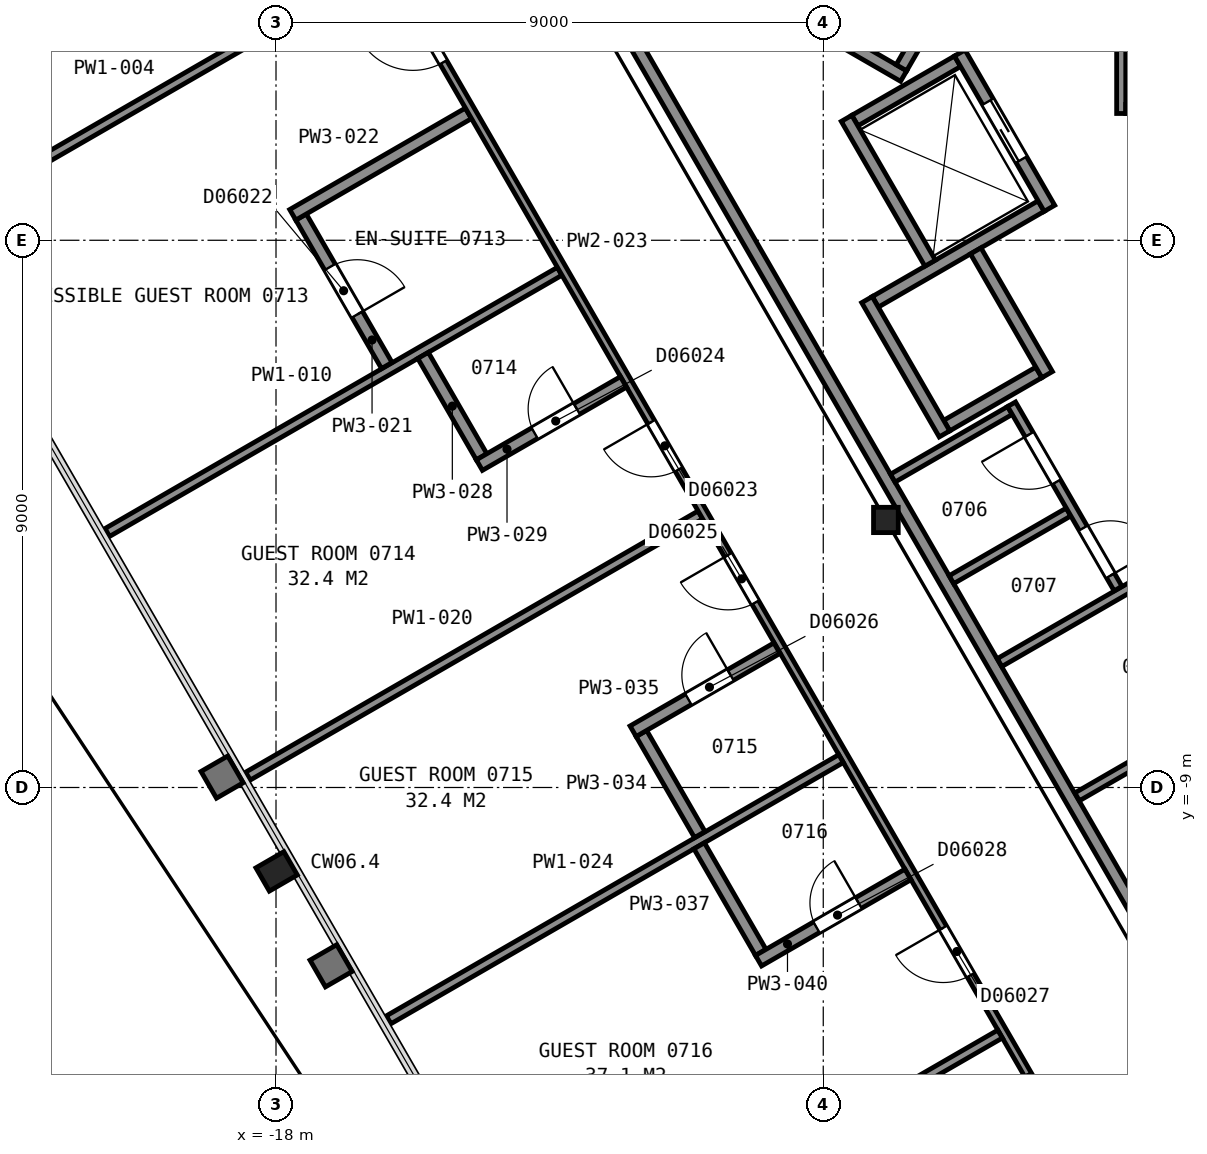
"""IFC4 building model, lengths in metres.
Left out: names, types, materials, properties, quantities, classifications, styles, units other than length and angle.
Written with IfcOpenShell. Run it as: python <this file> out.ifc"""

import sys

from ifc_helpers import new_model, si_unit, direction, frame, frame_2d, origin, origin_2d, place, context, subcontext, project, spatial, rectangle, i_section, extrude, element, fill, save


model = new_model("IFC4")
c1 = context("Model", 3, precision=1e-05, world=origin(), true_north=direction((0.0, 1.0)))
c2 = subcontext(c1, "Body", "Model", "MODEL_VIEW")
j1 = project(units=[si_unit("LENGTHUNIT", "METRE"), si_unit("PLANEANGLEUNIT", "RADIAN")], contexts=[c1])
p1 = place(None, origin())
s1 = spatial("IfcSite", under=j1, at=p1, CompositionType="ELEMENT")
p2 = place(p1, origin())
s2 = spatial("IfcBuilding", under=s1, at=p2, CompositionType="ELEMENT")
p3 = place(p2, frame((0.0, 0.0, 40.4)))
s3 = spatial("IfcBuildingStorey", under=s2, at=p3, CompositionType="ELEMENT", Elevation=40.4)
p4 = place(p3, frame((-17.99, -10.38, 0.0), z_axis=(0.0, 0.0, 1.0), x_axis=(-0.5, 0.866025403784, 0.0)))
e1 = element("IfcColumn", 1, at=p4, inside=s3, PredefinedType="COLUMN", context=c2, shape_type="SweptSolid", body=[
    extrude(i_section(OverallWidth=0.442, OverallDepth=0.531, WebThickness=0.066, FlangeThickness=0.106, FilletRadius=0.015, at=origin_2d()), origin(), (0.0, 0.0, 1.0), 3.575),
])
p5 = place(p3, frame((-7.97, -4.6, 0.0), z_axis=(0.0, 0.0, 1.0), x_axis=(1.0, 0.0, 0.0)))
e2 = element("IfcColumn", 2, at=p5, inside=s3, PredefinedType="COLUMN", context=c2, shape_type="SweptSolid", body=[
    extrude(i_section(OverallWidth=0.406, OverallDepth=0.417, WebThickness=0.03, FlangeThickness=0.048, FilletRadius=0.015, at=origin_2d()), origin(), (0.0, 0.0, 1.0), 3.6),
])
p6 = place(p3, frame((-7.678, 2.701, 0.0), z_axis=(0.0, 0.0, 1.0), x_axis=(-0.866026010844, 0.49999894854, 0.0)))
e3 = element("IfcWall", 3, at=p6, inside=s3, PredefinedType="PARTITIONING", context=c2, shape_type="SweptSolid", body=[
    extrude(rectangle(XDim=12.0, YDim=0.2, at=frame_2d((6.0, 0.0))), origin(), (0.0, 0.0, 1.0), 3.35),
])
p7 = place(p3, frame((-6.315, 5.262, 0.0), z_axis=(0.0, 0.0, 1.0), x_axis=(-0.500049511043, -0.865996816683, 0.0)))
e4 = element("IfcWall", 4, at=p7, inside=s3, PredefinedType="PARTITIONING", context=c2, shape_type="SweptSolid", body=[
    extrude(rectangle(XDim=2.8, YDim=0.2, at=frame_2d((1.4, 0.0))), origin(), (0.0, 0.0, 1.0), 3.35),
])
p8 = place(p3, frame((-6.97, -3.048, 0.0), z_axis=(0.0, 0.0, 1.0), x_axis=(0.866036909293, 0.499980071345, 0.0)))
e5 = element("IfcWall", 5, at=p8, inside=s3, PredefinedType="PARTITIONING", context=c2, shape_type="SweptSolid", body=[
    extrude(rectangle(XDim=1.75, YDim=0.2, at=frame_2d((0.875, 0.0))), origin(), (0.0, 0.0, 1.0), 3.6),
])
p9 = place(p3, frame((-8.145, -1.013, 0.0), z_axis=(0.0, 0.0, 1.0), x_axis=(0.866016494683, 0.500015430699, 0.0)))
e6 = element("IfcWall", 6, at=p9, inside=s3, PredefinedType="PARTITIONING", context=c2, shape_type="SweptSolid", body=[
    extrude(rectangle(XDim=3.15, YDim=0.2, at=frame_2d((1.575, 0.0))), origin(), (0.0, 0.0, 1.0), 3.6),
])
p10 = place(p3, frame((-8.48, 1.969, 0.0), z_axis=(0.0, 0.0, 1.0), x_axis=(0.866000020948, 0.500043961785, 0.0)))
e7 = element("IfcWall", 7, at=p10, inside=s3, PredefinedType="PARTITIONING", context=c2, shape_type="SweptSolid", body=[
    extrude(rectangle(XDim=1.95, YDim=0.2, at=frame_2d((0.975, 0.0))), origin(), (0.0, 0.0, 1.0), 3.6),
])
p11 = place(p3, frame((-5.28, 0.525, 0.0), z_axis=(0.0, 0.0, 1.0), x_axis=(-0.500037662692, 0.866003658127, 0.0)))
e8 = element("IfcWall", 8, at=p11, inside=s3, PredefinedType="PARTITIONING", context=c2, shape_type="SweptSolid", body=[
    extrude(rectangle(XDim=2.95, YDim=0.2, at=frame_2d((1.475, 0.0))), origin(), (0.0, 0.0, 1.0), 3.6),
])
p12 = place(p11, frame((0.925, 0.0, 0.0)))
e9 = element("IfcOpeningElement", 9, at=p12, cuts=e8, PredefinedType="OPENING", context=c2, shape_type="SweptSolid", body=[
    extrude(rectangle(XDim=1.1, YDim=2.1, at=frame_2d((0.55, 1.05))), frame((0.0, 0.11, 0.0), z_axis=(0.0, -1.0, 0.0), x_axis=(1.0, 0.0, 0.0)), (0.0, 0.0, 1.0), 0.22),
])
p13 = place(p3, frame((-5.318, -2.21, 0.0), z_axis=(0.0, 0.0, 1.0), x_axis=(-0.499938297808, 0.866061024631, 0.0)))
e10 = element("IfcWall", 10, at=p13, inside=s3, PredefinedType="PARTITIONING", context=c2, shape_type="SweptSolid", body=[
    extrude(rectangle(XDim=2.35, YDim=0.2, at=frame_2d((1.175, 0.0))), origin(), (0.0, 0.0, 1.0), 3.6),
])
p14 = place(p3, frame((-7.242, -0.376, 0.0), z_axis=(0.0, 0.0, 1.0), x_axis=(-0.499996545922, 0.866027397988, 0.0)))
e11 = element("IfcWall", 11, at=p14, inside=s3, PredefinedType="PARTITIONING", context=c2, shape_type="SweptSolid", body=[
    extrude(rectangle(XDim=2.75, YDim=0.2, at=frame_2d((1.375, 0.0))), origin(), (0.0, 0.0, 1.0), 3.6),
])
p15 = place(p3, frame((-7.006, -3.185, 0.0), z_axis=(0.0, 0.0, 1.0), x_axis=(-0.499990435942, 0.866030925526, 0.0)))
e12 = element("IfcWall", 12, at=p15, inside=s3, PredefinedType="PARTITIONING", context=c2, shape_type="SweptSolid", body=[
    extrude(rectangle(XDim=2.55, YDim=0.2, at=frame_2d((1.275, 0.0))), origin(), (0.0, 0.0, 1.0), 3.6),
])
p16 = place(p3, frame((-13.664, 5.946, 0.0), z_axis=(0.0, 0.0, 1.0), x_axis=(0.499994327219, -0.866028678941, 0.0)))
e13 = element("IfcWall", 13, at=p16, inside=s3, PredefinedType="PARTITIONING", context=c2, shape_type="SweptSolid", body=[
    extrude(rectangle(XDim=23.968, YDim=0.2, at=frame_2d((11.984, 0.0))), origin(), (0.0, 0.0, 1.0), 3.35),
])
p17 = place(p3, frame((-7.856, -3.912, 0.0), z_axis=(0.0, 0.0, 1.0), x_axis=(0.865971748, 0.500092923031, 0.0)))
e14 = element("IfcWall", 14, at=p17, inside=s3, PredefinedType="PARTITIONING", context=c2, shape_type="SweptSolid", body=[
    extrude(rectangle(XDim=2.225, YDim=0.15, at=frame_2d((1.112, 0.0))), origin(), (0.0, 0.0, 1.0), 3.35),
])
p18 = place(p3, frame((-6.892, -5.582, 0.0), z_axis=(0.0, 0.0, 1.0), x_axis=(0.865944298464, 0.500140452231, 0.0)))
e15 = element("IfcWall", 15, at=p18, inside=s3, PredefinedType="PARTITIONING", context=c2, shape_type="SweptSolid", body=[
    extrude(rectangle(XDim=2.224, YDim=0.15, at=frame_2d((1.112, 0.0))), origin(), (0.0, 0.0, 1.0), 3.35),
])
p19 = place(p3, frame((-6.1, -6.946, 0.0), z_axis=(0.0, 0.0, 1.0), x_axis=(0.866038200431, 0.499977834903, 0.0)))
e16 = element("IfcWall", 16, at=p19, inside=s3, PredefinedType="PARTITIONING", context=c2, shape_type="SweptSolid", body=[
    extrude(rectangle(XDim=4.22, YDim=0.15, at=frame_2d((2.11, 0.0))), origin(), (0.0, 0.0, 1.0), 3.35),
])
p20 = place(p3, frame((-4.152, -5.729, 0.0), z_axis=(0.0, 0.0, 1.0), x_axis=(-0.500024287448, 0.866011380966, 0.0)))
e17 = element("IfcWall", 17, at=p20, inside=s3, PredefinedType="PARTITIONING", context=c2, shape_type="SweptSolid", body=[
    extrude(rectangle(XDim=3.501, YDim=0.15, at=frame_2d((1.75, 0.0))), origin(), (0.0, 0.0, 1.0), 3.35),
])
p21 = place(p20, frame((2.026, 0.0, 0.0)))
e18 = element("IfcOpeningElement", 18, at=p21, cuts=e17, PredefinedType="OPENING", context=c2, shape_type="SweptSolid", body=[
    extrude(rectangle(XDim=0.9, YDim=2.1, at=frame_2d((0.45, 1.05))), frame((0.0, 0.085, 0.0), z_axis=(0.0, -1.0, 0.0), x_axis=(1.0, 0.0, 0.0)), (0.0, 0.0, 1.0), 0.17),
])
p22 = place(p20, frame((0.248, 0.0, 0.0)))
e19 = element("IfcOpeningElement", 19, at=p22, cuts=e17, PredefinedType="OPENING", context=c2, shape_type="SweptSolid", body=[
    extrude(rectangle(XDim=0.9, YDim=2.1, at=frame_2d((0.45, 1.05))), frame((0.0, 0.085, 0.0), z_axis=(0.0, -1.0, 0.0), x_axis=(1.0, 0.0, 0.0)), (0.0, 0.0, 1.0), 0.17),
])
p23 = place(p3, frame((-4.825, -9.154, 0.0), z_axis=(0.0, 0.0, 1.0), x_axis=(0.866023738697, 0.500002884005, 0.0)))
e20 = element("IfcWall", 20, at=p23, inside=s3, PredefinedType="PARTITIONING", context=c2, shape_type="SweptSolid", body=[
    extrude(rectangle(XDim=4.22, YDim=0.15, at=frame_2d((2.11, 0.0))), origin(), (0.0, 0.0, 1.0), 3.35),
])
p24 = place(p23, frame((1.595, 0.0, 0.0)))
e21 = element("IfcOpeningElement", 21, at=p24, cuts=e20, PredefinedType="OPENING", context=c2, shape_type="SweptSolid", body=[
    extrude(rectangle(XDim=0.9, YDim=2.1, at=frame_2d((0.45, 1.05))), frame((0.0, 0.085, 0.0), z_axis=(0.0, -1.0, 0.0), x_axis=(1.0, 0.0, 0.0)), (0.0, 0.0, 1.0), 0.17),
])
p25 = place(p3, frame((-4.1, 2.085, 0.0), z_axis=(0.0, 0.0, 1.0), x_axis=(0.0, 1.0, 0.0)))
e22 = element("IfcWall", 22, at=p25, inside=s3, PredefinedType="PARTITIONING", context=c2, shape_type="SweptSolid", body=[
    extrude(rectangle(XDim=3.523, YDim=0.15, at=frame_2d((1.761, 0.0))), origin(), (0.0, 0.0, 1.0), 3.35),
])
p26 = place(p3, frame((-4.025, 2.16, 0.0), z_axis=(0.0, 0.0, 1.0), x_axis=(1.0, 0.0, 0.0)))
e23 = element("IfcWall", 23, at=p26, inside=s3, PredefinedType="PARTITIONING", context=c2, shape_type="SweptSolid", body=[
    extrude(rectangle(XDim=1.238, YDim=0.15, at=frame_2d((0.619, 0.0))), origin(), (0.0, 0.0, 1.0), 3.35),
])
p27 = place(p3, frame((-23.693, 0.247, 0.0), z_axis=(0.0, 0.0, 1.0), x_axis=(0.866031705461, 0.499989085017, 0.0)))
e24 = element("IfcWall", 24, at=p27, inside=s3, PredefinedType="PARTITIONING", context=c2, shape_type="SweptSolid", body=[
    extrude(rectangle(XDim=8.587, YDim=0.15, at=frame_2d((4.293, 0.0))), origin(), (0.0, 0.0, 1.0), 2.613),
])
p28 = place(p3, frame((-20.775, -4.806, 0.0), z_axis=(0.0, 0.0, 1.0), x_axis=(0.865995804368, 0.50005126419, 0.0)))
e25 = element("IfcWall", 25, at=p28, inside=s3, PredefinedType="PARTITIONING", context=c2, shape_type="SweptSolid", body=[
    extrude(rectangle(XDim=8.591, YDim=0.15, at=frame_2d((4.295, 0.0))), origin(), (0.0, 0.0, 1.0), 2.613),
])
p29 = place(p3, frame((-18.462, -8.813, 0.0), z_axis=(0.0, 0.0, 1.0), x_axis=(0.866029425019, 0.499993034952, 0.0)))
e26 = element("IfcWall", 26, at=p29, inside=s3, PredefinedType="PARTITIONING", context=c2, shape_type="SweptSolid", body=[
    extrude(rectangle(XDim=8.591, YDim=0.15, at=frame_2d((4.296, 0.0))), origin(), (0.0, 0.0, 1.0), 2.613),
])
p30 = place(p3, frame((-17.588, 0.382, 0.0), z_axis=(0.0, 0.0, 1.0), x_axis=(0.499984757355, -0.866034203951, 0.0)))
e27 = element("IfcWall", 27, at=p30, inside=s3, PredefinedType="PARTITIONING", context=c2, shape_type="SweptSolid", body=[
    extrude(rectangle(XDim=2.82, YDim=0.2, at=frame_2d((1.41, 0.0))), origin(), (0.0, 0.0, 1.0), 2.613),
])
p31 = place(p30, frame((0.95, 0.0, 0.0)))
e28 = element("IfcOpeningElement", 28, at=p31, cuts=e27, PredefinedType="OPENING", context=c2, shape_type="SweptSolid", body=[
    extrude(rectangle(XDim=0.9, YDim=2.1, at=frame_2d((0.45, 1.05))), frame((0.0, 0.11, 0.0), z_axis=(0.0, -1.0, 0.0), x_axis=(1.0, 0.0, 0.0)), (0.0, 0.0, 1.0), 0.22),
])
p32 = place(p3, frame((-17.725, 0.419, 0.0), z_axis=(0.0, 0.0, 1.0), x_axis=(0.865960142641, 0.500113018585, 0.0)))
e29 = element("IfcWall", 29, at=p32, inside=s3, PredefinedType="PARTITIONING", context=c2, shape_type="SweptSolid", body=[
    extrude(rectangle(XDim=3.337, YDim=0.2, at=frame_2d((1.668, 0.0))), origin(), (0.0, 0.0, 1.0), 2.613),
])
p33 = place(p3, frame((-3.766, -16.958, 0.0), z_axis=(0.0, 0.0, 1.0), x_axis=(-0.500024758804, 0.866011108811, 0.0)))
e30 = element("IfcWall", 30, at=p33, inside=s3, PredefinedType="PARTITIONING", context=c2, shape_type="SweptSolid", body=[
    extrude(rectangle(XDim=26.402, YDim=0.125, at=frame_2d((13.201, 0.0))), origin(), (0.0, 0.0, 1.0), 2.613),
])
p34 = place(p33, frame((25.139, 0.0, 0.0)))
e31 = element("IfcOpeningElement", 31, at=p34, cuts=e30, PredefinedType="OPENING", context=c2, shape_type="SweptSolid", body=[
    extrude(rectangle(XDim=0.9, YDim=2.1, at=frame_2d((0.45, 1.05))), frame((0.0, 0.073, 0.0), z_axis=(0.0, -1.0, 0.0), x_axis=(1.0, 0.0, 0.0)), (0.0, 0.0, 1.0), 0.145),
])
p35 = place(p33, frame((22.963, 0.0, 0.0)))
e32 = element("IfcOpeningElement", 32, at=p35, cuts=e30, PredefinedType="OPENING", context=c2, shape_type="SweptSolid", body=[
    extrude(rectangle(XDim=1.0, YDim=2.1, at=frame_2d((0.5, 1.05))), frame((0.0, 0.073, 0.0), z_axis=(0.0, -1.0, 0.0), x_axis=(1.0, 0.0, 0.0)), (0.0, 0.0, 1.0), 0.145),
])
p36 = place(p33, frame((15.228, 0.0, 0.0)))
e33 = element("IfcOpeningElement", 33, at=p36, cuts=e30, PredefinedType="OPENING", context=c2, shape_type="SweptSolid", body=[
    extrude(rectangle(XDim=0.9, YDim=2.1, at=frame_2d((0.45, 1.05))), frame((0.0, 0.073, 0.0), z_axis=(0.0, -1.0, 0.0), x_axis=(1.0, 0.0, 0.0)), (0.0, 0.0, 1.0), 0.145),
])
p37 = place(p33, frame((12.702, 0.0, 0.0)))
e34 = element("IfcOpeningElement", 34, at=p37, cuts=e30, PredefinedType="OPENING", context=c2, shape_type="SweptSolid", body=[
    extrude(rectangle(XDim=0.9, YDim=2.1, at=frame_2d((0.45, 1.05))), frame((0.0, 0.073, 0.0), z_axis=(0.0, -1.0, 0.0), x_axis=(1.0, 0.0, 0.0)), (0.0, 0.0, 1.0), 0.145),
])
p38 = place(p33, frame((5.624, 0.0, 0.0)))
e35 = element("IfcOpeningElement", 35, at=p38, cuts=e30, PredefinedType="OPENING", context=c2, shape_type="SweptSolid", body=[
    extrude(rectangle(XDim=0.9, YDim=2.1, at=frame_2d((0.45, 1.05))), frame((0.0, 0.073, 0.0), z_axis=(0.0, -1.0, 0.0), x_axis=(1.0, 0.0, 0.0)), (0.0, 0.0, 1.0), 0.145),
])
p39 = place(p33, frame((2.843, 0.0, 0.0)))
e36 = element("IfcOpeningElement", 36, at=p39, cuts=e30, PredefinedType="OPENING", context=c2, shape_type="SweptSolid", body=[
    extrude(rectangle(XDim=0.9, YDim=2.1, at=frame_2d((0.45, 1.05))), frame((0.0, 0.073, 0.0), z_axis=(0.0, -1.0, 0.0), x_axis=(1.0, 0.0, 0.0)), (0.0, 0.0, 1.0), 0.145),
])
p40 = place(p3, frame((-16.148, -12.821, 0.0), z_axis=(0.0, 0.0, 1.0), x_axis=(0.866036528751, 0.499980730498, 0.0)))
e37 = element("IfcWall", 37, at=p40, inside=s3, PredefinedType="PARTITIONING", context=c2, shape_type="SweptSolid", body=[
    extrude(rectangle(XDim=8.592, YDim=0.15, at=frame_2d((4.296, 0.0))), origin(), (0.0, 0.0, 1.0), 2.613),
])
p41 = place(p3, frame((-15.582, -1.894, 0.0), z_axis=(0.0, 0.0, 1.0), x_axis=(0.500026156197, -0.86601030197, 0.0)))
e38 = element("IfcWall", 38, at=p41, inside=s3, PredefinedType="PARTITIONING", context=c2, shape_type="SweptSolid", body=[
    extrude(rectangle(XDim=1.925, YDim=0.2, at=frame_2d((0.963, 0.0))), origin(), (0.0, 0.0, 1.0), 2.613),
])
p42 = place(p3, frame((-14.656, -3.698, 0.0), z_axis=(0.0, 0.0, 1.0), x_axis=(0.866005850709, 0.50003386539, 0.0)))
e39 = element("IfcWall", 39, at=p42, inside=s3, PredefinedType="PARTITIONING", context=c2, shape_type="SweptSolid", body=[
    extrude(rectangle(XDim=2.737, YDim=0.2, at=frame_2d((1.369, 0.0))), origin(), (0.0, 0.0, 1.0), 2.613),
])
p43 = place(p42, frame((1.05, 0.0, 0.0)))
e40 = element("IfcOpeningElement", 40, at=p43, cuts=e39, PredefinedType="OPENING", context=c2, shape_type="SweptSolid", body=[
    extrude(rectangle(XDim=0.8, YDim=2.1, at=frame_2d((0.4, 1.05))), frame((0.0, 0.11, 0.0), z_axis=(0.0, -1.0, 0.0), x_axis=(1.0, 0.0, 0.0)), (0.0, 0.0, 1.0), 0.22),
])
p44 = place(p3, frame((-13.532, -17.351, 0.0), z_axis=(0.0, 0.0, 1.0), x_axis=(0.866002910178, 0.500038958046, 0.0)))
e41 = element("IfcWall", 41, at=p44, inside=s3, PredefinedType="PARTITIONING", context=c2, shape_type="SweptSolid", body=[
    extrude(rectangle(XDim=8.591, YDim=0.15, at=frame_2d((4.295, 0.0))), origin(), (0.0, 0.0, 1.0), 2.613),
])
p45 = place(p3, frame((-11.991, -8.112, 0.0), z_axis=(0.0, 0.0, 1.0), x_axis=(0.499913221443, -0.866075499611, 0.0)))
e42 = element("IfcWall", 42, at=p45, inside=s3, PredefinedType="PARTITIONING", context=c2, shape_type="SweptSolid", body=[
    extrude(rectangle(XDim=1.92, YDim=0.2, at=frame_2d((0.96, 0.0))), origin(), (0.0, 0.0, 1.0), 2.613),
])
p46 = place(p3, frame((-9.761, -6.709, 0.0), z_axis=(0.0, 0.0, 1.0), x_axis=(-0.866012976267, -0.500021524473, 0.0)))
e43 = element("IfcWall", 43, at=p46, inside=s3, PredefinedType="PARTITIONING", context=c2, shape_type="SweptSolid", body=[
    extrude(rectangle(XDim=2.732, YDim=0.2, at=frame_2d((1.366, 0.0))), origin(), (0.0, 0.0, 1.0), 2.613),
])
p47 = place(p46, frame((0.882, 0.0, 0.0)))
e44 = element("IfcOpeningElement", 44, at=p47, cuts=e43, PredefinedType="OPENING", context=c2, shape_type="SweptSolid", body=[
    extrude(rectangle(XDim=0.8, YDim=2.1, at=frame_2d((0.4, 1.05))), frame((0.0, 0.11, 0.0), z_axis=(0.0, -1.0, 0.0), x_axis=(1.0, 0.0, 0.0)), (0.0, 0.0, 1.0), 0.22),
])
p48 = place(p3, frame((-11.041, -9.959, 0.0), z_axis=(0.0, 0.0, 1.0), x_axis=(0.500042536776, -0.866000843773, 0.0)))
e45 = element("IfcWall", 45, at=p48, inside=s3, PredefinedType="PARTITIONING", context=c2, shape_type="SweptSolid", body=[
    extrude(rectangle(XDim=2.025, YDim=0.2, at=frame_2d((1.012, 0.0))), origin(), (0.0, 0.0, 1.0), 2.613),
])
p49 = place(p3, frame((-10.065, -11.849, 0.0), z_axis=(0.0, 0.0, 1.0), x_axis=(0.866048046904, 0.499960778915, 0.0)))
e46 = element("IfcWall", 46, at=p49, inside=s3, PredefinedType="PARTITIONING", context=c2, shape_type="SweptSolid", body=[
    extrude(rectangle(XDim=2.838, YDim=0.2, at=frame_2d((1.419, 0.0))), origin(), (0.0, 0.0, 1.0), 2.613),
])
p50 = place(p49, frame((1.1, 0.0, 0.0)))
e47 = element("IfcOpeningElement", 47, at=p50, cuts=e46, PredefinedType="OPENING", context=c2, shape_type="SweptSolid", body=[
    extrude(rectangle(XDim=0.8, YDim=2.1, at=frame_2d((0.4, 1.05))), frame((0.0, 0.11, 0.0), z_axis=(0.0, -1.0, 0.0), x_axis=(1.0, 0.0, 0.0)), (0.0, 0.0, 1.0), 0.22),
])
p51 = place(p12, origin())
e48 = element("IfcDoor", 48, at=p51, inside=s3, OperationType="SLIDING_TO_LEFT", PredefinedType="DOOR", context=c2, shape_type="SweptSolid", body=[
    extrude(rectangle(XDim=1.1, YDim=2.1, at=frame_2d((0.55, 1.05))), frame((0.0, 0.025, 0.0), z_axis=(0.0, -1.0, 0.0), x_axis=(1.0, 0.0, 0.0)), (0.0, 0.0, 1.0), 0.05),
])
fill(e9, e48)
p52 = place(p21, origin())
e49 = element("IfcDoor", 49, at=p52, inside=s3, OperationType="SINGLE_SWING_RIGHT", PredefinedType="DOOR", context=c2, shape_type="SweptSolid", body=[
    extrude(rectangle(XDim=0.9, YDim=2.1, at=frame_2d((0.45, 1.05))), frame((0.0, 0.025, 0.0), z_axis=(0.0, -1.0, 0.0), x_axis=(1.0, 0.0, 0.0)), (0.0, 0.0, 1.0), 0.05),
])
fill(e18, e49)
p53 = place(p22, origin())
e50 = element("IfcDoor", 50, at=p53, inside=s3, OperationType="SINGLE_SWING_LEFT", PredefinedType="DOOR", context=c2, shape_type="SweptSolid", body=[
    extrude(rectangle(XDim=0.9, YDim=2.1, at=frame_2d((0.45, 1.05))), frame((0.0, 0.025, 0.0), z_axis=(0.0, -1.0, 0.0), x_axis=(1.0, 0.0, 0.0)), (0.0, 0.0, 1.0), 0.05),
])
fill(e19, e50)
p54 = place(p31, origin())
e51 = element("IfcDoor", 51, at=p54, inside=s3, OperationType="SINGLE_SWING_RIGHT", PredefinedType="DOOR", context=c2, shape_type="SweptSolid", body=[
    extrude(rectangle(XDim=0.9, YDim=2.1, at=frame_2d((0.45, 1.05))), frame((0.0, 0.025, 0.0), z_axis=(0.0, -1.0, 0.0), x_axis=(1.0, 0.0, 0.0)), (0.0, 0.0, 1.0), 0.05),
])
fill(e28, e51)
p55 = place(p35, origin())
e52 = element("IfcDoor", 52, at=p55, inside=s3, OperationType="SINGLE_SWING_RIGHT", PredefinedType="DOOR", context=c2, shape_type="SweptSolid", body=[
    extrude(rectangle(XDim=1.0, YDim=2.1, at=frame_2d((0.5, 1.05))), frame((0.0, 0.025, 0.0), z_axis=(0.0, -1.0, 0.0), x_axis=(1.0, 0.0, 0.0)), (0.0, 0.0, 1.0), 0.05),
])
fill(e32, e52)
p56 = place(p36, origin())
e53 = element("IfcDoor", 53, at=p56, inside=s3, OperationType="SINGLE_SWING_RIGHT", PredefinedType="DOOR", context=c2, shape_type="SweptSolid", body=[
    extrude(rectangle(XDim=0.9, YDim=2.1, at=frame_2d((0.45, 1.05))), frame((0.0, 0.025, 0.0), z_axis=(0.0, -1.0, 0.0), x_axis=(1.0, 0.0, 0.0)), (0.0, 0.0, 1.0), 0.05),
])
fill(e33, e53)
p57 = place(p37, origin())
e54 = element("IfcDoor", 54, at=p57, inside=s3, OperationType="SINGLE_SWING_RIGHT", PredefinedType="DOOR", context=c2, shape_type="SweptSolid", body=[
    extrude(rectangle(XDim=0.9, YDim=2.1, at=frame_2d((0.45, 1.05))), frame((0.0, 0.025, 0.0), z_axis=(0.0, -1.0, 0.0), x_axis=(1.0, 0.0, 0.0)), (0.0, 0.0, 1.0), 0.05),
])
fill(e34, e54)
p58 = place(p38, origin())
e55 = element("IfcDoor", 55, at=p58, inside=s3, OperationType="SINGLE_SWING_RIGHT", PredefinedType="DOOR", context=c2, shape_type="SweptSolid", body=[
    extrude(rectangle(XDim=0.9, YDim=2.1, at=frame_2d((0.45, 1.05))), frame((0.0, 0.025, 0.0), z_axis=(0.0, -1.0, 0.0), x_axis=(1.0, 0.0, 0.0)), (0.0, 0.0, 1.0), 0.05),
])
fill(e35, e55)
p59 = place(p39, origin())
e56 = element("IfcDoor", 56, at=p59, inside=s3, OperationType="SINGLE_SWING_RIGHT", PredefinedType="DOOR", context=c2, shape_type="SweptSolid", body=[
    extrude(rectangle(XDim=0.9, YDim=2.1, at=frame_2d((0.45, 1.05))), frame((0.0, 0.025, 0.0), z_axis=(0.0, -1.0, 0.0), x_axis=(1.0, 0.0, 0.0)), (0.0, 0.0, 1.0), 0.05),
])
fill(e36, e56)
p60 = place(p43, origin())
e57 = element("IfcDoor", 57, at=p60, inside=s3, OperationType="SINGLE_SWING_RIGHT", PredefinedType="DOOR", context=c2, shape_type="SweptSolid", body=[
    extrude(rectangle(XDim=0.8, YDim=2.1, at=frame_2d((0.4, 1.05))), frame((0.0, 0.025, 0.0), z_axis=(0.0, -1.0, 0.0), x_axis=(1.0, 0.0, 0.0)), (0.0, 0.0, 1.0), 0.05),
])
fill(e40, e57)
p61 = place(p47, origin())
e58 = element("IfcDoor", 58, at=p61, inside=s3, OperationType="SINGLE_SWING_LEFT", PredefinedType="DOOR", context=c2, shape_type="SweptSolid", body=[
    extrude(rectangle(XDim=0.8, YDim=2.1, at=frame_2d((0.4, 1.05))), frame((0.0, 0.025, 0.0), z_axis=(0.0, -1.0, 0.0), x_axis=(1.0, 0.0, 0.0)), (0.0, 0.0, 1.0), 0.05),
])
fill(e44, e58)
p62 = place(p50, origin())
e59 = element("IfcDoor", 59, at=p62, inside=s3, OperationType="SINGLE_SWING_RIGHT", PredefinedType="DOOR", context=c2, shape_type="SweptSolid", body=[
    extrude(rectangle(XDim=0.8, YDim=2.1, at=frame_2d((0.4, 1.05))), frame((0.0, 0.025, 0.0), z_axis=(0.0, -1.0, 0.0), x_axis=(1.0, 0.0, 0.0)), (0.0, 0.0, 1.0), 0.05),
])
fill(e47, e59)
save(model, sys.argv[1])
